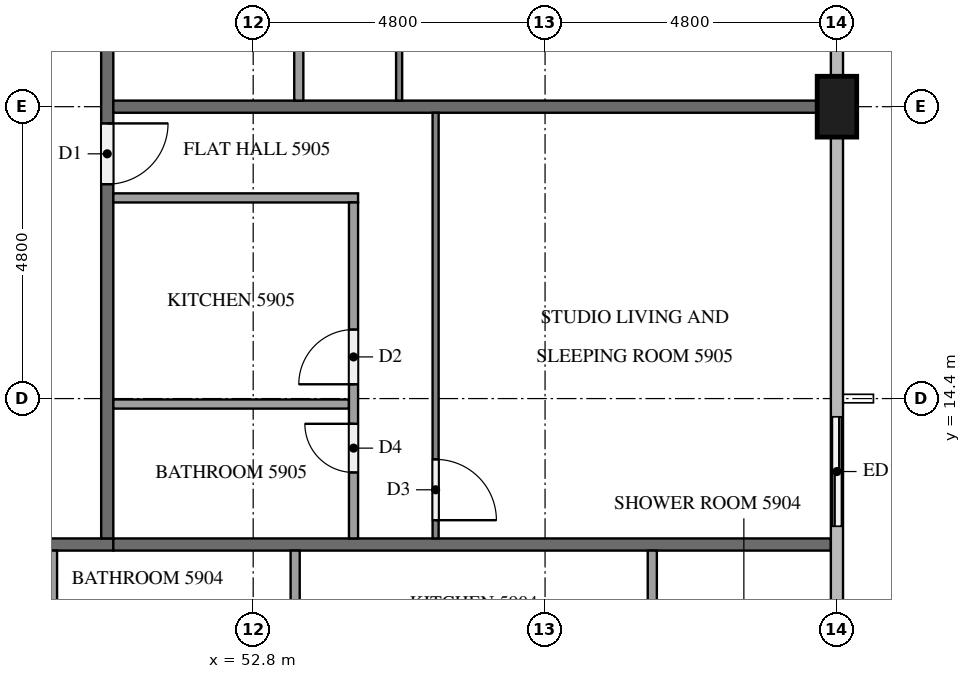
"""IFC4 building model, lengths in metres.
Left out: names, types, materials, properties, quantities, classifications, styles, units other than length and angle.
Written with IfcOpenShell. Run it as: python <this file> out.ifc"""

import sys

from ifc_helpers import new_model, si_unit, direction, frame, frame_2d, origin, origin_2d, place, context, subcontext, project, spatial, rectangle, extrude, element, fill, save


model = new_model("IFC4")
c1 = context("Model", 3, precision=1e-05, world=origin(), true_north=direction((0.0, 1.0)))
c2 = subcontext(c1, "Body", "Model", "MODEL_VIEW")
j1 = project(units=[si_unit("LENGTHUNIT", "METRE"), si_unit("PLANEANGLEUNIT", "RADIAN")], contexts=[c1])
p1 = place(None, origin())
s1 = spatial("IfcSite", under=j1, at=p1, CompositionType="ELEMENT")
p2 = place(p1, origin())
s2 = spatial("IfcBuilding", under=s1, at=p2, CompositionType="ELEMENT")
p3 = place(p2, frame((0.0, 0.0, 226.3)))
s3 = spatial("IfcBuildingStorey", under=s2, at=p3, CompositionType="ELEMENT", Elevation=226.3)
p4 = place(p3, frame((62.4, 19.2, 0.0), z_axis=(0.0, 0.0, 1.0), x_axis=(0.0, 1.0, 0.0)))
e1 = element("IfcColumn", 1, at=p4, inside=s3, PredefinedType="COLUMN", context=c2, shape_type="SweptSolid", body=[
    extrude(rectangle(XDim=1.0, YDim=0.65, at=origin_2d()), origin(), (0.0, 0.0, 1.0), 3.2),
])
p5 = place(p3, frame((62.4, 12.0, 0.0), z_axis=(0.0, 0.0, 1.0), x_axis=(0.0, 1.0, 0.0)))
e2 = element("IfcWall", 2, at=p5, inside=s3, PredefinedType="SOLIDWALL", context=c2, shape_type="SweptSolid", body=[
    extrude(rectangle(XDim=2.4, YDim=0.15, at=frame_2d((1.2, 0.0))), origin(), (0.0, 0.0, 1.0), 3.2),
])
p6 = place(p5, frame((0.3, 0.0, 0.0)))
e3 = element("IfcOpeningElement", 3, at=p6, cuts=e2, PredefinedType="OPENING", context=c2, shape_type="SweptSolid", body=[
    extrude(rectangle(XDim=1.8, YDim=2.4, at=frame_2d((0.9, 1.2))), frame((0.0, 0.085, 0.0), z_axis=(0.0, -1.0, 0.0), x_axis=(1.0, 0.0, 0.0)), (0.0, 0.0, 1.0), 0.17),
])
p7 = place(p3, frame((50.5, 12.0, 0.0), z_axis=(0.0, 0.0, 1.0), x_axis=(-1.0, 0.0, 0.0)))
e4 = element("IfcWall", 4, at=p7, inside=s3, PredefinedType="PARTITIONING", context=c2, shape_type="SweptSolid", body=[
    extrude(rectangle(XDim=38.6, YDim=0.2, at=frame_2d((19.3, 0.0))), origin(), (0.0, 0.0, 1.0), 3.2),
])
p8 = place(p7, frame((36.375, 0.0, 0.0)))
e5 = element("IfcOpeningElement", 5, at=p8, cuts=e4, PredefinedType="OPENING", context=c2, shape_type="SweptSolid", body=[
    extrude(rectangle(XDim=1.0, YDim=2.1, at=frame_2d((0.5, 1.05))), frame((0.0, 0.11, 0.0), z_axis=(0.0, -1.0, 0.0), x_axis=(1.0, 0.0, 0.0)), (0.0, 0.0, 1.0), 0.22),
])
p9 = place(p7, frame((34.825, 0.0, 0.0)))
e6 = element("IfcOpeningElement", 6, at=p9, cuts=e4, PredefinedType="OPENING", context=c2, shape_type="SweptSolid", body=[
    extrude(rectangle(XDim=1.0, YDim=2.1, at=frame_2d((0.5, 1.05))), frame((0.0, 0.11, 0.0), z_axis=(0.0, -1.0, 0.0), x_axis=(1.0, 0.0, 0.0)), (0.0, 0.0, 1.0), 0.22),
])
p10 = place(p7, frame((20.375, 0.0, 0.0)))
e7 = element("IfcOpeningElement", 7, at=p10, cuts=e4, PredefinedType="OPENING", context=c2, shape_type="SweptSolid", body=[
    extrude(rectangle(XDim=1.1, YDim=2.1, at=frame_2d((0.55, 1.05))), frame((0.0, 0.11, 0.0), z_axis=(0.0, -1.0, 0.0), x_axis=(1.0, 0.0, 0.0)), (0.0, 0.0, 1.0), 0.22),
])
p11 = place(p7, frame((1.225, 0.0, 0.0)))
e8 = element("IfcOpeningElement", 8, at=p11, cuts=e4, PredefinedType="OPENING", context=c2, shape_type="SweptSolid", body=[
    extrude(rectangle(XDim=1.0, YDim=2.1, at=frame_2d((0.5, 1.05))), frame((0.0, 0.11, 0.0), z_axis=(0.0, -1.0, 0.0), x_axis=(1.0, 0.0, 0.0)), (0.0, 0.0, 1.0), 0.22),
])
p12 = place(p3, frame((50.4, 40.7, 0.0), z_axis=(0.0, 0.0, 1.0), x_axis=(0.0, -1.0, 0.0)))
e9 = element("IfcWall", 9, at=p12, inside=s3, PredefinedType="PARTITIONING", context=c2, shape_type="SweptSolid", body=[
    extrude(rectangle(XDim=28.6, YDim=0.2, at=frame_2d((14.3, 0.0))), origin(), (0.0, 0.0, 1.0), 3.2),
])
p13 = place(p12, frame((21.775, 0.0, 0.0)))
e10 = element("IfcOpeningElement", 10, at=p13, cuts=e9, PredefinedType="OPENING", context=c2, shape_type="SweptSolid", body=[
    extrude(rectangle(XDim=1.0, YDim=2.1, at=frame_2d((0.5, 1.05))), frame((0.0, 0.11, 0.0), z_axis=(0.0, -1.0, 0.0), x_axis=(1.0, 0.0, 0.0)), (0.0, 0.0, 1.0), 0.22),
])
p14 = place(p12, frame((7.375, 0.0, 0.0)))
e11 = element("IfcOpeningElement", 11, at=p14, cuts=e9, PredefinedType="OPENING", context=c2, shape_type="SweptSolid", body=[
    extrude(rectangle(XDim=1.0, YDim=2.1, at=frame_2d((0.5, 1.05))), frame((0.0, 0.11, 0.0), z_axis=(0.0, -1.0, 0.0), x_axis=(1.0, 0.0, 0.0)), (0.0, 0.0, 1.0), 0.22),
])
p15 = place(p12, frame((0.175, 0.0, 0.0)))
e12 = element("IfcOpeningElement", 12, at=p15, cuts=e9, PredefinedType="OPENING", context=c2, shape_type="SweptSolid", body=[
    extrude(rectangle(XDim=1.0, YDim=2.1, at=frame_2d((0.5, 1.05))), frame((0.0, 0.11, 0.0), z_axis=(0.0, -1.0, 0.0), x_axis=(1.0, 0.0, 0.0)), (0.0, 0.0, 1.0), 0.22),
])
p16 = place(p3, frame((50.5, 12.0, 0.0), z_axis=(0.0, 0.0, 1.0), x_axis=(1.0, 0.0, 0.0)))
e13 = element("IfcWall", 13, at=p16, inside=s3, PredefinedType="PARTITIONING", context=c2, shape_type="SweptSolid", body=[
    extrude(rectangle(XDim=11.8, YDim=0.2, at=frame_2d((5.9, 0.0))), origin(), (0.0, 0.0, 1.0), 3.2),
])
p17 = place(p3, frame((50.5, 19.2, 0.0), z_axis=(0.0, 0.0, 1.0), x_axis=(1.0, 0.0, 0.0)))
e14 = element("IfcWall", 14, at=p17, inside=s3, PredefinedType="PARTITIONING", context=c2, shape_type="SweptSolid", body=[
    extrude(rectangle(XDim=11.575, YDim=0.2, at=frame_2d((5.788, 0.0))), origin(), (0.0, 0.0, 1.0), 3.2),
])
for number, where, z_axis, x_axis in (
    (15, (53.49, 11.9, 0.0), (0.0, 0.0, 1.0), (0.0, -1.0, 0.0)),
    (16, (59.364, 11.9, 0.0), (0.0, 0.0, 1.0), (0.0, -1.0, 0.0)),
):
    element("IfcWall", number, at=place(p3, frame(where, z_axis=z_axis, x_axis=x_axis)), inside=s3, PredefinedType="PARTITIONING", context=c2, shape_type="SweptSolid", body=[
        extrude(rectangle(XDim=1.775, YDim=0.15, at=frame_2d((0.887, 0.0))), origin(), (0.0, 0.0, 1.0), 3.2),
    ])
p18 = place(p3, frame((49.5, 11.9, 0.0), z_axis=(0.0, 0.0, 1.0), x_axis=(0.0, -1.0, 0.0)))
e17 = element("IfcWall", 17, at=p18, inside=s3, PredefinedType="PARTITIONING", context=c2, shape_type="SweptSolid", body=[
    extrude(rectangle(XDim=1.925, YDim=0.15, at=frame_2d((0.962, 0.0))), origin(), (0.0, 0.0, 1.0), 3.2),
])
p19 = place(p3, frame((55.8, 19.1, 0.0), z_axis=(0.0, 0.0, 1.0), x_axis=(0.0, -1.0, 0.0)))
e18 = element("IfcWall", 18, at=p19, inside=s3, PredefinedType="PARTITIONING", context=c2, shape_type="SweptSolid", body=[
    extrude(rectangle(XDim=7.0, YDim=0.1, at=frame_2d((3.5, 0.0))), origin(), (0.0, 0.0, 1.0), 3.2),
])
p20 = place(p19, frame((5.7, 0.0, 0.0)))
e19 = element("IfcOpeningElement", 19, at=p20, cuts=e18, PredefinedType="OPENING", context=c2, shape_type="SweptSolid", body=[
    extrude(rectangle(XDim=1.0, YDim=2.1, at=frame_2d((0.5, 1.05))), frame((0.0, 0.06, 0.0), z_axis=(0.0, -1.0, 0.0), x_axis=(1.0, 0.0, 0.0)), (0.0, 0.0, 1.0), 0.12),
])
p21 = place(p3, frame((50.5, 14.31, 0.0), z_axis=(0.0, 0.0, 1.0), x_axis=(1.0, 0.0, 0.0)))
e20 = element("IfcWall", 20, at=p21, inside=s3, PredefinedType="PARTITIONING", context=c2, shape_type="SweptSolid", body=[
    extrude(rectangle(XDim=3.875, YDim=0.15, at=frame_2d((1.938, 0.0))), origin(), (0.0, 0.0, 1.0), 3.2),
])
p22 = place(p3, frame((50.5, 17.7, 0.0), z_axis=(0.0, 0.0, 1.0), x_axis=(1.0, 0.0, 0.0)))
e21 = element("IfcWall", 21, at=p22, inside=s3, PredefinedType="PARTITIONING", context=c2, shape_type="SweptSolid", body=[
    extrude(rectangle(XDim=4.025, YDim=0.15, at=frame_2d((2.012, 0.0))), origin(), (0.0, 0.0, 1.0), 3.2),
])
p23 = place(p3, frame((54.45, 12.1, 0.0), z_axis=(0.0, 0.0, 1.0), x_axis=(0.0, 1.0, 0.0)))
e22 = element("IfcWall", 22, at=p23, inside=s3, PredefinedType="PARTITIONING", context=c2, shape_type="SweptSolid", body=[
    extrude(rectangle(XDim=5.525, YDim=0.15, at=frame_2d((2.762, 0.0))), origin(), (0.0, 0.0, 1.0), 3.2),
])
p24 = place(p23, frame((2.535, 0.0, 0.0)))
e23 = element("IfcOpeningElement", 23, at=p24, cuts=e22, PredefinedType="OPENING", context=c2, shape_type="SweptSolid", body=[
    extrude(rectangle(XDim=0.9, YDim=2.1, at=frame_2d((0.45, 1.05))), frame((0.0, 0.085, 0.0), z_axis=(0.0, -1.0, 0.0), x_axis=(1.0, 0.0, 0.0)), (0.0, 0.0, 1.0), 0.17),
])
p25 = place(p23, frame((1.085, 0.0, 0.0)))
e24 = element("IfcOpeningElement", 24, at=p25, cuts=e22, PredefinedType="OPENING", context=c2, shape_type="SweptSolid", body=[
    extrude(rectangle(XDim=0.8, YDim=2.1, at=frame_2d((0.4, 1.05))), frame((0.0, 0.085, 0.0), z_axis=(0.0, -1.0, 0.0), x_axis=(1.0, 0.0, 0.0)), (0.0, 0.0, 1.0), 0.17),
])
p26 = place(p3, frame((55.2, 33.5, 0.0), z_axis=(0.0, 0.0, 1.0), x_axis=(0.0, -1.0, 0.0)))
e25 = element("IfcWall", 25, at=p26, inside=s3, PredefinedType="PARTITIONING", context=c2, shape_type="SweptSolid", body=[
    extrude(rectangle(XDim=14.2, YDim=0.1, at=frame_2d((7.1, 0.0))), origin(), (0.0, 0.0, 1.0), 3.2),
])
p27 = place(p26, frame((0.3, 0.0, 0.0)))
e26 = element("IfcOpeningElement", 26, at=p27, cuts=e25, PredefinedType="OPENING", context=c2, shape_type="SweptSolid", body=[
    extrude(rectangle(XDim=0.9, YDim=2.1, at=frame_2d((0.45, 1.05))), frame((0.0, 0.06, 0.0), z_axis=(0.0, -1.0, 0.0), x_axis=(1.0, 0.0, 0.0)), (0.0, 0.0, 1.0), 0.12),
])
p28 = place(p26, frame((8.25, 0.0, 0.0)))
e27 = element("IfcOpeningElement", 27, at=p28, cuts=e25, PredefinedType="OPENING", context=c2, shape_type="SweptSolid", body=[
    extrude(rectangle(XDim=0.9, YDim=2.1, at=frame_2d((0.45, 1.05))), frame((0.0, 0.06, 0.0), z_axis=(0.0, -1.0, 0.0), x_axis=(1.0, 0.0, 0.0)), (0.0, 0.0, 1.0), 0.12),
])
p29 = place(p26, frame((9.85, 0.0, 0.0)))
e28 = element("IfcOpeningElement", 28, at=p29, cuts=e25, PredefinedType="OPENING", context=c2, shape_type="SweptSolid", body=[
    extrude(rectangle(XDim=1.0, YDim=2.1, at=frame_2d((0.5, 1.05))), frame((0.0, 0.06, 0.0), z_axis=(0.0, -1.0, 0.0), x_axis=(1.0, 0.0, 0.0)), (0.0, 0.0, 1.0), 0.12),
])
p30 = place(p3, frame((53.55, 19.3, 0.0), z_axis=(0.0, 0.0, 1.0), x_axis=(0.0, 1.0, 0.0)))
e29 = element("IfcWall", 29, at=p30, inside=s3, PredefinedType="PARTITIONING", context=c2, shape_type="SweptSolid", body=[
    extrude(rectangle(XDim=12.725, YDim=0.15, at=frame_2d((6.362, 0.0))), origin(), (0.0, 0.0, 1.0), 3.2),
])
p31 = place(p30, frame((11.525, 0.0, 0.0)))
e30 = element("IfcOpeningElement", 30, at=p31, cuts=e29, PredefinedType="OPENING", context=c2, shape_type="SweptSolid", body=[
    extrude(rectangle(XDim=0.9, YDim=2.1, at=frame_2d((0.45, 1.05))), frame((0.0, 0.085, 0.0), z_axis=(0.0, -1.0, 0.0), x_axis=(1.0, 0.0, 0.0)), (0.0, 0.0, 1.0), 0.17),
])
p32 = place(p30, frame((3.261, 0.0, 0.0)))
e31 = element("IfcOpeningElement", 31, at=p32, cuts=e29, PredefinedType="OPENING", context=c2, shape_type="SweptSolid", body=[
    extrude(rectangle(XDim=0.9, YDim=2.1, at=frame_2d((0.45, 1.05))), frame((0.0, 0.085, 0.0), z_axis=(0.0, -1.0, 0.0), x_axis=(1.0, 0.0, 0.0)), (0.0, 0.0, 1.0), 0.17),
])
p33 = place(p30, frame((1.812, 0.0, 0.0)))
e32 = element("IfcOpeningElement", 32, at=p33, cuts=e29, PredefinedType="OPENING", context=c2, shape_type="SweptSolid", body=[
    extrude(rectangle(XDim=0.8, YDim=2.1, at=frame_2d((0.4, 1.05))), frame((0.0, 0.085, 0.0), z_axis=(0.0, -1.0, 0.0), x_axis=(1.0, 0.0, 0.0)), (0.0, 0.0, 1.0), 0.17),
])
p34 = place(p6, origin())
e33 = element("IfcDoor", 33, at=p34, inside=s3, OperationType="SLIDING_TO_LEFT", PredefinedType="DOOR", context=c2, shape_type="SweptSolid", body=[
    extrude(rectangle(XDim=1.8, YDim=2.4, at=frame_2d((0.9, 1.2))), frame((0.0, 0.025, 0.0), z_axis=(0.0, -1.0, 0.0), x_axis=(1.0, 0.0, 0.0)), (0.0, 0.0, 1.0), 0.05),
])
fill(e3, e33)
p35 = place(p13, origin())
e34 = element("IfcDoor", 34, at=p35, inside=s3, OperationType="SINGLE_SWING_LEFT", PredefinedType="DOOR", context=c2, shape_type="SweptSolid", body=[
    extrude(rectangle(XDim=1.0, YDim=2.1, at=frame_2d((0.5, 1.05))), frame((0.0, 0.025, 0.0), z_axis=(0.0, -1.0, 0.0), x_axis=(1.0, 0.0, 0.0)), (0.0, 0.0, 1.0), 0.05),
])
fill(e10, e34)
p36 = place(p20, origin())
e35 = element("IfcDoor", 35, at=p36, inside=s3, OperationType="SINGLE_SWING_RIGHT", PredefinedType="DOOR", context=c2, shape_type="SweptSolid", body=[
    extrude(rectangle(XDim=1.0, YDim=2.1, at=frame_2d((0.5, 1.05))), frame((0.0, 0.025, 0.0), z_axis=(0.0, -1.0, 0.0), x_axis=(1.0, 0.0, 0.0)), (0.0, 0.0, 1.0), 0.05),
])
fill(e19, e35)
p37 = place(p24, origin())
e36 = element("IfcDoor", 36, at=p37, inside=s3, OperationType="SINGLE_SWING_LEFT", PredefinedType="DOOR", context=c2, shape_type="SweptSolid", body=[
    extrude(rectangle(XDim=0.9, YDim=2.1, at=frame_2d((0.45, 1.05))), frame((0.0, 0.025, 0.0), z_axis=(0.0, -1.0, 0.0), x_axis=(1.0, 0.0, 0.0)), (0.0, 0.0, 1.0), 0.05),
])
fill(e23, e36)
p38 = place(p25, origin())
e37 = element("IfcDoor", 37, at=p38, inside=s3, OperationType="SINGLE_SWING_RIGHT", PredefinedType="DOOR", context=c2, shape_type="SweptSolid", body=[
    extrude(rectangle(XDim=0.8, YDim=2.1, at=frame_2d((0.4, 1.05))), frame((0.0, 0.025, 0.0), z_axis=(0.0, -1.0, 0.0), x_axis=(1.0, 0.0, 0.0)), (0.0, 0.0, 1.0), 0.05),
])
fill(e24, e37)
save(model, sys.argv[1])
